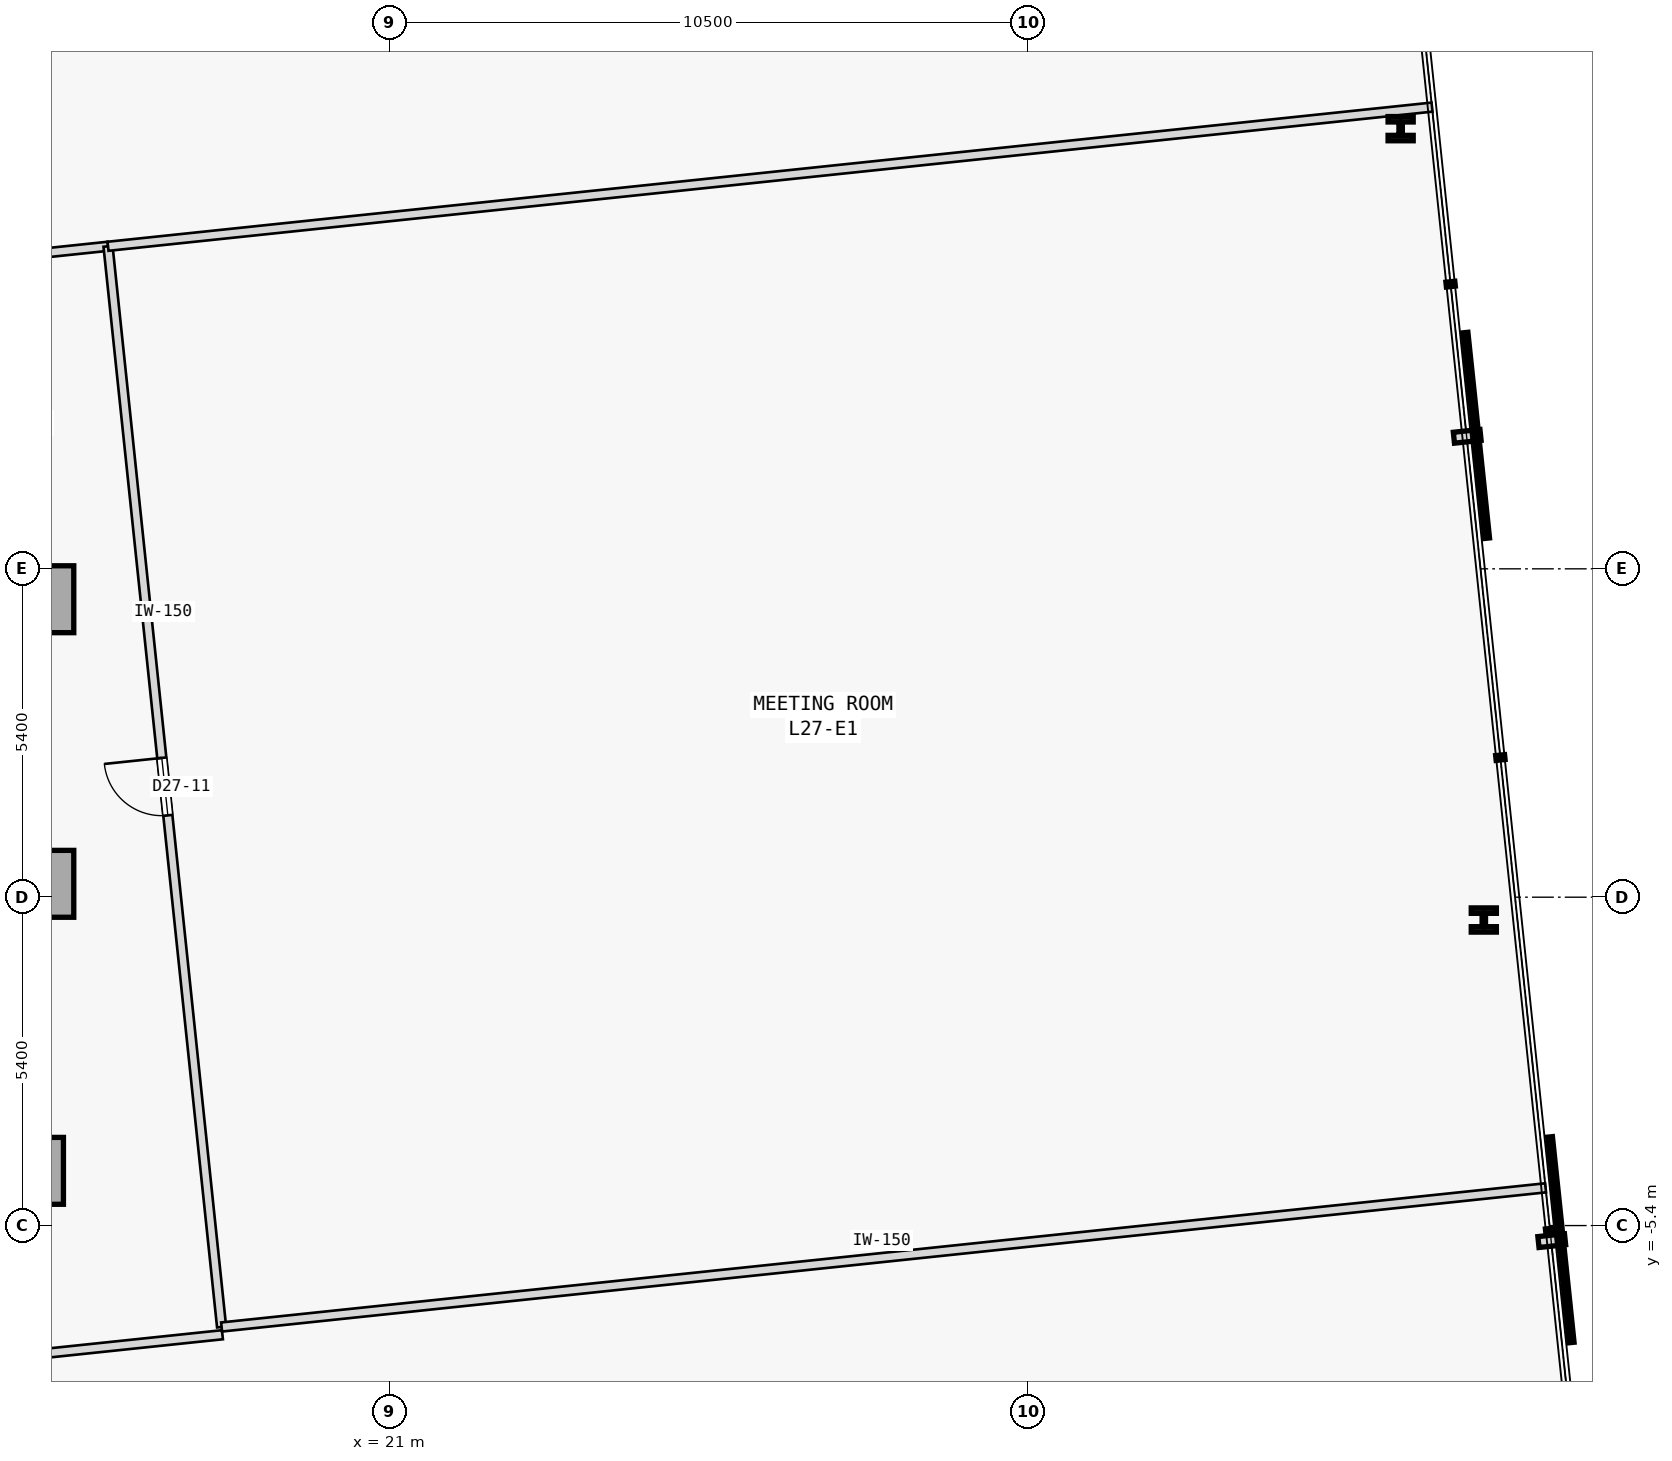
"""IFC4 building model, lengths in metres.
Left out: names, types, materials, properties, quantities, classifications, styles, units other than length and angle.
Written with IfcOpenShell. Run it as: python <this file> out.ifc"""

import sys

from ifc_helpers import new_model, si_unit, direction, frame, frame_2d, origin, origin_2d, place, context, subcontext, project, spatial, rectangle, i_section, extrude, element, fill, save


model = new_model("IFC4")
c1 = context("Model", 3, precision=1e-05, world=origin(), true_north=direction((0.0, 1.0)))
c2 = subcontext(c1, "Body", "Model", "MODEL_VIEW")
j1 = project(units=[si_unit("LENGTHUNIT", "METRE"), si_unit("PLANEANGLEUNIT", "RADIAN")], contexts=[c1])
p1 = place(None, origin())
s1 = spatial("IfcSite", under=j1, at=p1, CompositionType="ELEMENT")
p2 = place(p1, origin())
s2 = spatial("IfcBuilding", under=s1, at=p2, CompositionType="ELEMENT")
p3 = place(p2, frame((0.0, 0.0, 109.6)))
s3 = spatial("IfcBuildingStorey", under=s2, at=p3, CompositionType="ELEMENT", Elevation=109.6)
for number, where, z_axis, x_axis in (
    (1, (15.25, 4.9, 0.0), (0.0, 0.0, 1.0), (1.0, 0.0, 0.0)),
    (2, (15.25, 0.22, 0.0), (0.0, 0.0, 1.0), (1.0, 0.0, 0.0)),
    (3, (15.08, -4.5, 0.0), (0.0, 0.0, 1.0), (1.0, 0.0, 0.0)),
):
    element("IfcColumn", number, at=place(p3, frame(where, z_axis=z_axis, x_axis=x_axis)), inside=s3, PredefinedType="COLUMN", context=c2, shape_type="SweptSolid", body=[
        extrude(rectangle(XDim=1.1, YDim=1.1, at=origin_2d()), origin(), (0.0, 0.0, 1.0), 3.7),
    ])
for number, where, z_axis, x_axis in (
    (4, (38.988, -0.375, 0.0), (0.0, 0.0, 1.0), (1.0, 0.0, 0.0)),
    (5, (37.621, 12.638, 0.0), (0.0, 0.0, 1.0), (1.0, 0.0, 0.0)),
):
    element("IfcColumn", number, at=place(p3, frame(where, z_axis=z_axis, x_axis=x_axis)), inside=s3, PredefinedType="COLUMN", context=c2, shape_type="SweptSolid", body=[
        extrude(i_section(OverallWidth=0.413, OverallDepth=0.398, WebThickness=0.056, FlangeThickness=0.089, FilletRadius=0.015, at=origin_2d()), origin(), (0.0, 0.0, 1.0), 3.7),
    ])
p4 = place(p3, frame((-18.021, 7.09, 0.0), z_axis=(0.0, 0.0, 1.0), x_axis=(0.994522464549, 0.104523047737, 0.0)))
e6 = element("IfcWall", 6, at=p4, inside=s3, PredefinedType="PARTITIONING", context=c2, shape_type="SweptSolid", body=[
    extrude(rectangle(XDim=34.574, YDim=0.15, at=frame_2d((17.287, 0.0))), origin(), (0.0, 0.0, 1.0), 3.475),
])
p5 = place(p4, frame((16.812, 0.0, 0.0)))
e7 = element("IfcOpeningElement", 7, at=p5, cuts=e6, PredefinedType="OPENING", context=c2, shape_type="SweptSolid", body=[
    extrude(rectangle(XDim=0.95, YDim=2.15, at=frame_2d((0.475, 1.075))), frame((0.0, 0.085, 0.0), z_axis=(0.0, -1.0, 0.0), x_axis=(1.0, 0.0, 0.0)), (0.0, 0.0, 1.0), 0.17),
])
p6 = place(p3, frame((0.361, -9.075, 0.0), z_axis=(0.0, 0.0, 1.0), x_axis=(0.994523293042, 0.104515164432, 0.0)))
e8 = element("IfcWall", 8, at=p6, inside=s3, PredefinedType="PARTITIONING", context=c2, shape_type="SweptSolid", body=[
    extrude(rectangle(XDim=17.982, YDim=0.15, at=frame_2d((8.991, 0.0))), origin(), (0.0, 0.0, 1.0), 3.475),
])
p7 = place(p6, frame((5.819, 0.0, 0.0)))
e9 = element("IfcOpeningElement", 9, at=p7, cuts=e8, PredefinedType="OPENING", context=c2, shape_type="SweptSolid", body=[
    extrude(rectangle(XDim=0.95, YDim=2.15, at=frame_2d((0.475, 1.075))), frame((0.0, 0.085, 0.0), z_axis=(0.0, -1.0, 0.0), x_axis=(1.0, 0.0, 0.0)), (0.0, 0.0, 1.0), 0.17),
])
p8 = place(p3, frame((18.231, -7.068, 0.0), z_axis=(0.0, 0.0, 1.0), x_axis=(-0.104529034836, 0.994521835294, 0.0)))
e10 = element("IfcWall", 10, at=p8, inside=s3, PredefinedType="PARTITIONING", context=c2, shape_type="SweptSolid", body=[
    extrude(rectangle(XDim=17.87, YDim=0.15, at=frame_2d((8.935, 0.0))), origin(), (0.0, 0.0, 1.0), 3.475),
])
p9 = place(p8, frame((8.46, 0.0, 0.0)))
e11 = element("IfcOpeningElement", 11, at=p9, cuts=e10, PredefinedType="OPENING", context=c2, shape_type="SweptSolid", body=[
    extrude(rectangle(XDim=0.95, YDim=2.15, at=frame_2d((0.475, 1.075))), frame((0.0, 0.085, 0.0), z_axis=(0.0, -1.0, 0.0), x_axis=(1.0, 0.0, 0.0)), (0.0, 0.0, 1.0), 0.17),
])
p10 = place(p3, frame((16.363, 10.704, 0.0), z_axis=(0.0, 0.0, 1.0), x_axis=(0.994521206634, 0.104535015934, 0.0)))
e12 = element("IfcWall", 12, at=p10, inside=s3, PredefinedType="PARTITIONING", context=c2, shape_type="SweptSolid", body=[
    extrude(rectangle(XDim=21.893, YDim=0.15, at=frame_2d((10.946, 0.0))), origin(), (0.0, 0.0, 1.0), 3.475),
])
p11 = place(p3, frame((18.231, -7.068, 0.0), z_axis=(0.0, 0.0, 1.0), x_axis=(0.994521328491, 0.104533856601, 0.0)))
e13 = element("IfcWall", 13, at=p11, inside=s3, PredefinedType="PARTITIONING", context=c2, shape_type="SweptSolid", body=[
    extrude(rectangle(XDim=21.893, YDim=0.15, at=frame_2d((10.947, 0.0))), origin(), (0.0, 0.0, 1.0), 3.475),
])
p12 = place(p9, origin())
e14 = element("IfcDoor", 14, at=p12, inside=s3, OperationType="SINGLE_SWING_RIGHT", PredefinedType="DOOR", context=c2, shape_type="SweptSolid", body=[
    extrude(rectangle(XDim=0.95, YDim=2.15, at=frame_2d((0.475, 1.075))), frame((0.0, 0.025, 0.0), z_axis=(0.0, -1.0, 0.0), x_axis=(1.0, 0.0, 0.0)), (0.0, 0.0, 1.0), 0.05),
])
fill(e11, e14)
save(model, sys.argv[1])
